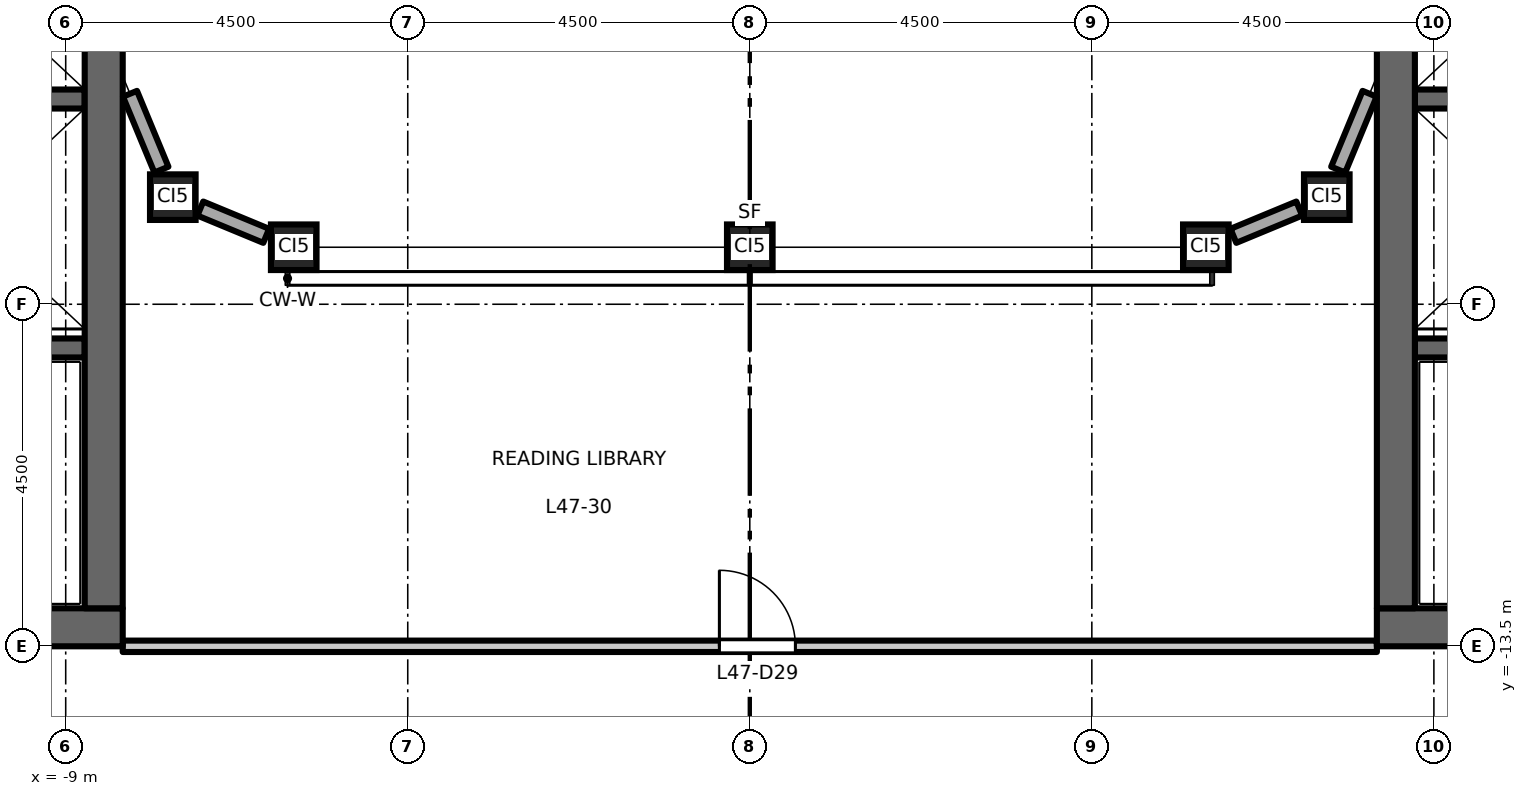
"""IFC4 building model, lengths in metres.
Left out: names, types, materials, properties, quantities, classifications, styles, units other than length and angle.
Written with IfcOpenShell. Run it as: python <this file> out.ifc"""

import sys

from ifc_helpers import new_model, si_unit, direction, frame, frame_2d, origin, origin_2d, place, context, subcontext, project, spatial, rectangle, hollow_rectangle, extrude, element, fill, save


model = new_model("IFC4")
c1 = context("Model", 3, precision=1e-05, world=origin(), true_north=direction((0.0, 1.0)))
c2 = subcontext(c1, "Body", "Model", "MODEL_VIEW")
j1 = project(units=[si_unit("LENGTHUNIT", "METRE"), si_unit("PLANEANGLEUNIT", "RADIAN")], contexts=[c1])
p1 = place(None, origin())
s1 = spatial("IfcSite", under=j1, at=p1, CompositionType="ELEMENT")
p2 = place(p1, origin())
s2 = spatial("IfcBuilding", under=s1, at=p2, CompositionType="ELEMENT")
p3 = place(p2, frame((0.0, 0.0, 219.7)))
s3 = spatial("IfcBuildingStorey", under=s2, at=p3, CompositionType="ELEMENT", Elevation=219.7)
for number, where, z_axis, x_axis in (
    (1, (-7.591, -7.591, 0.0), (0.0, 0.0, 1.0), (1.0, 0.0, 0.0)),
    (2, (-6.0, -8.25, 0.0), (0.0, 0.0, 1.0), (1.0, 0.0, 0.0)),
    (3, (0.0, -8.25, 0.0), (0.0, 0.0, 1.0), (1.0, 0.0, 0.0)),
    (4, (6.0, -8.25, 0.0), (0.0, 0.0, 1.0), (1.0, 0.0, 0.0)),
    (5, (7.591, -7.591, 0.0), (0.0, 0.0, 1.0), (1.0, 0.0, 0.0)),
):
    element("IfcColumn", number, at=place(p3, frame(where, z_axis=z_axis, x_axis=x_axis)), inside=s3, PredefinedType="COLUMN", context=c2, shape_type="SweptSolid", body=[
        extrude(hollow_rectangle(XDim=0.6, YDim=0.6, WallThickness=0.032, at=origin_2d()), origin(), (0.0, 0.0, 1.0), 4.5),
    ])
p4 = place(p3, frame((-8.75, -6.3, 0.0), z_axis=(0.0, 0.0, 1.0), x_axis=(-1.0, 0.0, 0.0)))
e6 = element("IfcWall", 6, at=p4, inside=s3, PredefinedType="SHEAR", context=c2, shape_type="SweptSolid", body=[
    extrude(rectangle(XDim=3.1, YDim=0.25, at=frame_2d((1.55, 0.0))), origin(), (0.0, 0.0, 1.0), 4.35),
])
p5 = place(p3, frame((-8.75, -9.575, 0.0), z_axis=(0.0, 0.0, 1.0), x_axis=(-1.0, 0.0, 0.0)))
e7 = element("IfcWall", 7, at=p5, inside=s3, PredefinedType="SHEAR", context=c2, shape_type="SweptSolid", body=[
    extrude(rectangle(XDim=8.0, YDim=0.25, at=frame_2d((4.0, 0.0))), origin(), (0.0, 0.0, 1.0), 4.35),
])
p6 = place(p5, frame((6.65, 0.0, 0.0)))
e8 = element("IfcOpeningElement", 8, at=p6, cuts=e7, PredefinedType="OPENING", context=c2, shape_type="SweptSolid", body=[
    extrude(rectangle(XDim=1.1, YDim=2.1, at=frame_2d((0.55, 1.05))), frame((0.0, 0.135, 0.0), z_axis=(0.0, -1.0, 0.0), x_axis=(1.0, 0.0, 0.0)), (0.0, 0.0, 1.0), 0.27),
])
p7 = place(p3, frame((-8.25, -13.25, 0.0), z_axis=(0.0, 0.0, 1.0), x_axis=(-1.0, 0.0, 0.0)))
e9 = element("IfcWall", 9, at=p7, inside=s3, PredefinedType="SHEAR", context=c2, shape_type="SweptSolid", body=[
    extrude(rectangle(XDim=13.5, YDim=0.5, at=frame_2d((6.75, 0.0))), origin(), (0.0, 0.0, 1.0), 4.35),
])
p8 = place(p3, frame((-8.5, -13.0, 0.0), z_axis=(0.0, 0.0, 1.0), x_axis=(0.0, 1.0, 0.0)))
e10 = element("IfcWall", 10, at=p8, inside=s3, PredefinedType="SHEAR", context=c2, shape_type="SweptSolid", body=[
    extrude(rectangle(XDim=26.0, YDim=0.5, at=frame_2d((13.0, 0.0))), origin(), (0.0, 0.0, 1.0), 4.35),
])
p9 = place(p3, frame((8.75, -6.3, 0.0), z_axis=(0.0, 0.0, 1.0), x_axis=(1.0, 0.0, 0.0)))
e11 = element("IfcWall", 11, at=p9, inside=s3, PredefinedType="SHEAR", context=c2, shape_type="SweptSolid", body=[
    extrude(rectangle(XDim=3.1, YDim=0.25, at=frame_2d((1.55, 0.0))), origin(), (0.0, 0.0, 1.0), 4.35),
])
p10 = place(p3, frame((8.75, -9.575, 0.0), z_axis=(0.0, 0.0, 1.0), x_axis=(1.0, 0.0, 0.0)))
e12 = element("IfcWall", 12, at=p10, inside=s3, PredefinedType="SHEAR", context=c2, shape_type="SweptSolid", body=[
    extrude(rectangle(XDim=8.0, YDim=0.25, at=frame_2d((4.0, 0.0))), origin(), (0.0, 0.0, 1.0), 4.35),
])
p11 = place(p10, frame((6.65, 0.0, 0.0)))
e13 = element("IfcOpeningElement", 13, at=p11, cuts=e12, PredefinedType="OPENING", context=c2, shape_type="SweptSolid", body=[
    extrude(rectangle(XDim=1.1, YDim=2.1, at=frame_2d((0.55, 1.05))), frame((0.0, 0.135, 0.0), z_axis=(0.0, -1.0, 0.0), x_axis=(1.0, 0.0, 0.0)), (0.0, 0.0, 1.0), 0.27),
])
p12 = place(p3, frame((8.25, -13.25, 0.0), z_axis=(0.0, 0.0, 1.0), x_axis=(1.0, 0.0, 0.0)))
e14 = element("IfcWall", 14, at=p12, inside=s3, PredefinedType="SHEAR", context=c2, shape_type="SweptSolid", body=[
    extrude(rectangle(XDim=13.5, YDim=0.5, at=frame_2d((6.75, 0.0))), origin(), (0.0, 0.0, 1.0), 4.35),
])
p13 = place(p3, frame((8.5, -13.0, 0.0), z_axis=(0.0, 0.0, 1.0), x_axis=(0.0, 1.0, 0.0)))
e15 = element("IfcWall", 15, at=p13, inside=s3, PredefinedType="SHEAR", context=c2, shape_type="SweptSolid", body=[
    extrude(rectangle(XDim=26.0, YDim=0.5, at=frame_2d((13.0, 0.0))), origin(), (0.0, 0.0, 1.0), 4.35),
])
p14 = place(p3, frame((6.362, -8.1, 0.0), z_axis=(0.0, 0.0, 1.0), x_axis=(0.923829670615, 0.382803787458, 0.0)))
e16 = element("IfcWall", 16, at=p14, inside=s3, PredefinedType="STANDARD", context=c2, shape_type="SweptSolid", body=[
    extrude(rectangle(XDim=0.938, YDim=0.2, at=frame_2d((0.469, 0.0))), origin(), (0.0, 0.0, 1.0), 3.918),
])
for number, where, z_axis, x_axis in (
    (17, (7.741, -7.229, 0.0), (0.0, 0.0, 1.0), (0.383, 0.924, 0.0)),
    (18, (-8.154, -6.231, 0.0), (0.0, 0.0, 1.0), (0.383, -0.924, 0.0)),
):
    element("IfcWall", number, at=place(p3, frame(where, z_axis=z_axis, x_axis=x_axis)), inside=s3, PredefinedType="STANDARD", context=c2, shape_type="SweptSolid", body=[
        extrude(rectangle(XDim=1.08, YDim=0.2, at=frame_2d((0.54, 0.0))), origin(), (0.0, 0.0, 1.0), 3.918),
    ])
p15 = place(p3, frame((-7.229, -7.741, 0.0), z_axis=(0.0, 0.0, 1.0), x_axis=(0.923829670615, -0.382803787458, 0.0)))
e19 = element("IfcWall", 19, at=p15, inside=s3, PredefinedType="STANDARD", context=c2, shape_type="SweptSolid", body=[
    extrude(rectangle(XDim=0.938, YDim=0.2, at=frame_2d((0.469, 0.0))), origin(), (0.0, 0.0, 1.0), 3.918),
])
p16 = place(p3, frame((-8.25, -13.5, 0.0), z_axis=(0.0, 0.0, 1.0), x_axis=(1.0, 0.0, 0.0)))
e20 = element("IfcWall", 20, at=p16, inside=s3, PredefinedType="PARTITIONING", context=c2, shape_type="SweptSolid", body=[
    extrude(rectangle(XDim=16.5, YDim=0.15, at=frame_2d((8.25, 0.0))), origin(), (0.0, 0.0, 1.0), 3.95),
])
p17 = place(p16, frame((7.85, 0.0, 0.0)))
e21 = element("IfcOpeningElement", 21, at=p17, cuts=e20, PredefinedType="OPENING", context=c2, shape_type="SweptSolid", body=[
    extrude(rectangle(XDim=1.0, YDim=2.1, at=frame_2d((0.5, 1.05))), frame((0.0, 0.085, 0.0), z_axis=(0.0, -1.0, 0.0), x_axis=(1.0, 0.0, 0.0)), (0.0, 0.0, 1.0), 0.17),
])
p18 = place(p17, origin())
e22 = element("IfcDoor", 22, at=p18, inside=s3, OperationType="SINGLE_SWING_LEFT", PredefinedType="DOOR", context=c2, shape_type="SweptSolid", body=[
    extrude(rectangle(XDim=1.0, YDim=2.1, at=frame_2d((0.5, 1.05))), frame((0.0, 0.025, 0.0), z_axis=(0.0, -1.0, 0.0), x_axis=(1.0, 0.0, 0.0)), (0.0, 0.0, 1.0), 0.05),
])
fill(e21, e22)
save(model, sys.argv[1])
